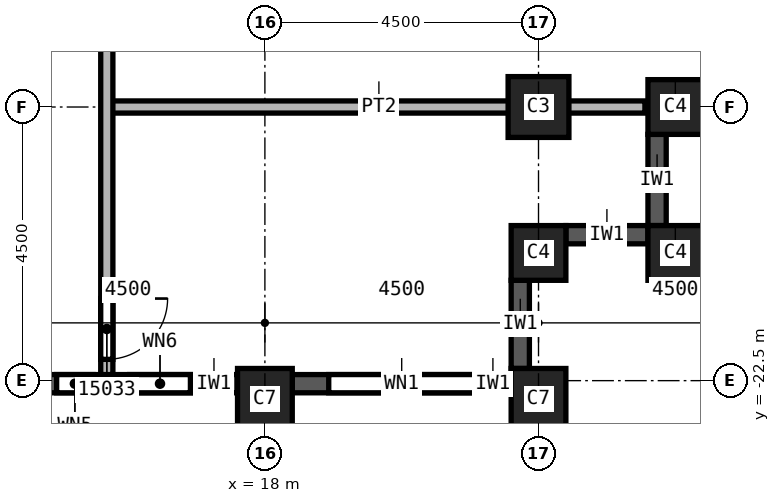
"""IFC4 building model, lengths in metres.
Left out: names, types, materials, properties, quantities, classifications, styles, units other than length and angle.
Written with IfcOpenShell. Run it as: python <this file> out.ifc"""

import sys

from ifc_helpers import new_model, si_unit, direction, frame, frame_2d, origin, origin_2d, place, context, subcontext, project, spatial, rectangle, extrude, element, fill, save


model = new_model("IFC4")
c1 = context("Model", 3, precision=1e-05, world=origin(), true_north=direction((0.0, 1.0)))
c2 = subcontext(c1, "Body", "Model", "MODEL_VIEW")
j1 = project(units=[si_unit("LENGTHUNIT", "METRE"), si_unit("PLANEANGLEUNIT", "RADIAN")], contexts=[c1])
p1 = place(None, origin())
s1 = spatial("IfcSite", under=j1, at=p1, CompositionType="ELEMENT")
p2 = place(p1, origin())
s2 = spatial("IfcBuilding", under=s1, at=p2, CompositionType="ELEMENT")
p3 = place(p2, frame((0.0, 0.0, 232.0)))
s3 = spatial("IfcBuildingStorey", under=s2, at=p3, CompositionType="ELEMENT", Elevation=232.0)
p4 = place(p3, frame((22.5, -18.0, 0.0), z_axis=(0.0, 0.0, 1.0), x_axis=(1.0, 0.0, 0.0)))
e1 = element("IfcColumn", 1, at=p4, inside=s3, PredefinedType="COLUMN", context=c2, shape_type="SweptSolid", body=[
    extrude(rectangle(XDim=1.0, YDim=1.0, at=origin_2d()), origin(), (0.0, 0.0, 1.0), 3.6),
])
for number, where, z_axis, x_axis in (
    (2, (18.0, -22.8, 0.0), (0.0, 0.0, 1.0), (1.0, 0.0, 0.0)),
    (3, (22.5, -22.8, 0.0), (0.0, 0.0, 1.0), (1.0, 0.0, 0.0)),
):
    element("IfcColumn", number, at=place(p3, frame(where, z_axis=z_axis, x_axis=x_axis)), inside=s3, PredefinedType="COLUMN", context=c2, shape_type="SweptSolid", body=[
        extrude(rectangle(XDim=0.9, YDim=1.0, at=origin_2d()), origin(), (0.0, 0.0, 1.0), 3.6),
    ])
for number, where, z_axis, x_axis in (
    (4, (22.5, -20.4, 0.0), (0.0, 0.0, 1.0), (1.0, 0.0, 0.0)),
    (5, (24.75, -20.4, 0.0), (0.0, 0.0, 1.0), (1.0, 0.0, 0.0)),
    (6, (24.75, -18.0, 0.0), (0.0, 0.0, 1.0), (1.0, 0.0, 0.0)),
):
    element("IfcColumn", number, at=place(p3, frame(where, z_axis=z_axis, x_axis=x_axis)), inside=s3, PredefinedType="COLUMN", context=c2, shape_type="SweptSolid", body=[
        extrude(rectangle(XDim=0.9, YDim=0.9, at=origin_2d()), origin(), (0.0, 0.0, 1.0), 3.6),
    ])
p5 = place(p3, frame((13.95, -22.55, 0.0), z_axis=(0.0, 0.0, 1.0), x_axis=(1.0, 0.0, 0.0)))
e7 = element("IfcWall", 7, at=p5, inside=s3, PredefinedType="SOLIDWALL", context=c2, shape_type="SweptSolid", body=[
    extrude(rectangle(XDim=3.6, YDim=0.3, at=frame_2d((1.8, 0.0))), origin(), (0.0, 0.0, 1.0), 3.0),
])
p6 = place(p5, frame((0.625, 0.0, 0.8)))
e8 = element("IfcOpeningElement", 8, at=p6, cuts=e7, PredefinedType="OPENING", context=c2, shape_type="SweptSolid", body=[
    extrude(rectangle(XDim=0.6, YDim=1.95, at=frame_2d((0.3, 0.975))), frame((0.0, 0.15, 0.0), z_axis=(0.0, -1.0, 0.0), x_axis=(1.0, 0.0, 0.0)), (0.0, 0.0, 1.0), 0.3),
])
p7 = place(p5, frame((1.825, 0.0, 0.8)))
e9 = element("IfcOpeningElement", 9, at=p7, cuts=e7, PredefinedType="OPENING", context=c2, shape_type="SweptSolid", body=[
    extrude(rectangle(XDim=1.0, YDim=1.95, at=frame_2d((0.5, 0.975))), frame((0.0, 0.15, 0.0), z_axis=(0.0, -1.0, 0.0), x_axis=(1.0, 0.0, 0.0)), (0.0, 0.0, 1.0), 0.3),
])
p8 = place(p3, frame((18.45, -22.55, 0.0), z_axis=(0.0, 0.0, 1.0), x_axis=(1.0, 0.0, 0.0)))
e10 = element("IfcWall", 10, at=p8, inside=s3, PredefinedType="SOLIDWALL", context=c2, shape_type="SweptSolid", body=[
    extrude(rectangle(XDim=3.6, YDim=0.3, at=frame_2d((1.8, 0.0))), origin(), (0.0, 0.0, 1.0), 3.0),
])
p9 = place(p8, frame((0.6, 0.0, 0.8)))
e11 = element("IfcOpeningElement", 11, at=p9, cuts=e10, PredefinedType="OPENING", context=c2, shape_type="SweptSolid", body=[
    extrude(rectangle(XDim=2.4, YDim=1.95, at=frame_2d((1.2, 0.975))), frame((0.0, 0.15, 0.0), z_axis=(0.0, -1.0, 0.0), x_axis=(1.0, 0.0, 0.0)), (0.0, 0.0, 1.0), 0.3),
])
p10 = place(p3, frame((22.2, -22.3, 0.0), z_axis=(0.0, 0.0, 1.0), x_axis=(0.0, 1.0, 0.0)))
e12 = element("IfcWall", 12, at=p10, inside=s3, PredefinedType="SOLIDWALL", context=c2, shape_type="SweptSolid", body=[
    extrude(rectangle(XDim=1.45, YDim=0.3, at=frame_2d((0.725, 0.0))), origin(), (0.0, 0.0, 1.0), 3.0),
])
p11 = place(p3, frame((22.95, -20.1, 0.0), z_axis=(0.0, 0.0, 1.0), x_axis=(1.0, 0.0, 0.0)))
e13 = element("IfcWall", 13, at=p11, inside=s3, PredefinedType="SOLIDWALL", context=c2, shape_type="SweptSolid", body=[
    extrude(rectangle(XDim=1.35, YDim=0.3, at=frame_2d((0.675, 0.0))), origin(), (0.0, 0.0, 1.0), 3.0),
])
p12 = place(p3, frame((24.45, -19.95, 0.0), z_axis=(0.0, 0.0, 1.0), x_axis=(0.0, 1.0, 0.0)))
e14 = element("IfcWall", 14, at=p12, inside=s3, PredefinedType="SOLIDWALL", context=c2, shape_type="SweptSolid", body=[
    extrude(rectangle(XDim=1.5, YDim=0.3, at=frame_2d((0.75, 0.0))), origin(), (0.0, 0.0, 1.0), 3.0),
])
p13 = place(p3, frame((15.4, -18.0, 0.0), z_axis=(0.0, 0.0, 1.0), x_axis=(1.0, 0.0, 0.0)))
e15 = element("IfcWall", 15, at=p13, inside=s3, PredefinedType="PARTITIONING", context=c2, shape_type="SweptSolid", body=[
    extrude(rectangle(XDim=8.85, YDim=0.2, at=frame_2d((4.425, 0.0))), origin(), (0.0, 0.0, 1.0), 3.6),
])
p14 = place(p3, frame((15.4, 22.4, 0.0), z_axis=(0.0, 0.0, 1.0), x_axis=(0.0, -1.0, 0.0)))
e16 = element("IfcWall", 16, at=p14, inside=s3, PredefinedType="PARTITIONING", context=c2, shape_type="SweptSolid", body=[
    extrude(rectangle(XDim=44.8, YDim=0.2, at=frame_2d((22.4, 0.0))), origin(), (0.0, 0.0, 1.0), 3.6),
])
p15 = place(p14, frame((18.5, 0.0, 0.0)))
e17 = element("IfcOpeningElement", 17, at=p15, cuts=e16, PredefinedType="OPENING", context=c2, shape_type="SweptSolid", body=[
    extrude(rectangle(XDim=1.0, YDim=2.1, at=frame_2d((0.5, 1.05))), frame((0.0, 0.1, 0.0), z_axis=(0.0, -1.0, 0.0), x_axis=(1.0, 0.0, 0.0)), (0.0, 0.0, 1.0), 0.2),
])
p16 = place(p14, frame((9.95, 0.0, 0.0)))
e18 = element("IfcOpeningElement", 18, at=p16, cuts=e16, PredefinedType="OPENING", context=c2, shape_type="SweptSolid", body=[
    extrude(rectangle(XDim=1.0, YDim=2.1, at=frame_2d((0.5, 1.05))), frame((0.0, 0.1, 0.0), z_axis=(0.0, -1.0, 0.0), x_axis=(1.0, 0.0, 0.0)), (0.0, 0.0, 1.0), 0.2),
])
p17 = place(p14, frame((1.3, 0.0, 0.0)))
e19 = element("IfcOpeningElement", 19, at=p17, cuts=e16, PredefinedType="OPENING", context=c2, shape_type="SweptSolid", body=[
    extrude(rectangle(XDim=1.0, YDim=2.1, at=frame_2d((0.5, 1.05))), frame((0.0, 0.1, 0.0), z_axis=(0.0, -1.0, 0.0), x_axis=(1.0, 0.0, 0.0)), (0.0, 0.0, 1.0), 0.2),
])
p18 = place(p14, frame((43.55, 0.0, 0.0)))
e20 = element("IfcOpeningElement", 20, at=p18, cuts=e16, PredefinedType="OPENING", context=c2, shape_type="SweptSolid", body=[
    extrude(rectangle(XDim=1.0, YDim=2.1, at=frame_2d((0.5, 1.05))), frame((0.0, 0.1, 0.0), z_axis=(0.0, -1.0, 0.0), x_axis=(1.0, 0.0, 0.0)), (0.0, 0.0, 1.0), 0.2),
])
p19 = place(p14, frame((38.3, 0.0, 0.0)))
e21 = element("IfcOpeningElement", 21, at=p19, cuts=e16, PredefinedType="OPENING", context=c2, shape_type="SweptSolid", body=[
    extrude(rectangle(XDim=1.0, YDim=2.1, at=frame_2d((0.5, 1.05))), frame((0.0, 0.1, 0.0), z_axis=(0.0, -1.0, 0.0), x_axis=(1.0, 0.0, 0.0)), (0.0, 0.0, 1.0), 0.2),
])
p20 = place(p14, frame((30.65, 0.0, 0.0)))
e22 = element("IfcOpeningElement", 22, at=p20, cuts=e16, PredefinedType="OPENING", context=c2, shape_type="SweptSolid", body=[
    extrude(rectangle(XDim=1.0, YDim=2.1, at=frame_2d((0.5, 1.05))), frame((0.0, 0.1, 0.0), z_axis=(0.0, -1.0, 0.0), x_axis=(1.0, 0.0, 0.0)), (0.0, 0.0, 1.0), 0.2),
])
p21 = place(p14, frame((24.2, 0.0, 0.0)))
e23 = element("IfcOpeningElement", 23, at=p21, cuts=e16, PredefinedType="OPENING", context=c2, shape_type="SweptSolid", body=[
    extrude(rectangle(XDim=1.0, YDim=2.1, at=frame_2d((0.5, 1.05))), frame((0.0, 0.1, 0.0), z_axis=(0.0, -1.0, 0.0), x_axis=(1.0, 0.0, 0.0)), (0.0, 0.0, 1.0), 0.2),
])
p22 = place(p9, origin())
e24 = element("IfcWindow", 24, at=p22, inside=s3, PartitioningType="SINGLE_PANEL", PredefinedType="WINDOW", context=c2, shape_type="SweptSolid", body=[
    extrude(rectangle(XDim=2.4, YDim=1.95, at=frame_2d((1.2, 0.975))), frame((0.0, 0.03, 0.0), z_axis=(0.0, -1.0, 0.0), x_axis=(1.0, 0.0, 0.0)), (0.0, 0.0, 1.0), 0.06),
])
fill(e11, e24)
p23 = place(p18, origin())
e25 = element("IfcDoor", 25, at=p23, inside=s3, OperationType="SINGLE_SWING_RIGHT", PredefinedType="DOOR", context=c2, shape_type="SweptSolid", body=[
    extrude(rectangle(XDim=1.0, YDim=2.1, at=frame_2d((0.5, 1.05))), frame((0.0, 0.025, 0.0), z_axis=(0.0, -1.0, 0.0), x_axis=(1.0, 0.0, 0.0)), (0.0, 0.0, 1.0), 0.05),
])
fill(e20, e25)
p24 = place(p6, origin())
e26 = element("IfcWindow", 26, at=p24, inside=s3, PartitioningType="SINGLE_PANEL", PredefinedType="WINDOW", context=c2, shape_type="SweptSolid", body=[
    extrude(rectangle(XDim=0.6, YDim=1.95, at=frame_2d((0.3, 0.975))), frame((0.0, 0.03, 0.0), z_axis=(0.0, -1.0, 0.0), x_axis=(1.0, 0.0, 0.0)), (0.0, 0.0, 1.0), 0.06),
])
fill(e8, e26)
p25 = place(p7, origin())
e27 = element("IfcWindow", 27, at=p25, inside=s3, PartitioningType="SINGLE_PANEL", PredefinedType="WINDOW", context=c2, shape_type="SweptSolid", body=[
    extrude(rectangle(XDim=1.0, YDim=1.95, at=frame_2d((0.5, 0.975))), frame((0.0, 0.03, 0.0), z_axis=(0.0, -1.0, 0.0), x_axis=(1.0, 0.0, 0.0)), (0.0, 0.0, 1.0), 0.06),
])
fill(e9, e27)
save(model, sys.argv[1])
